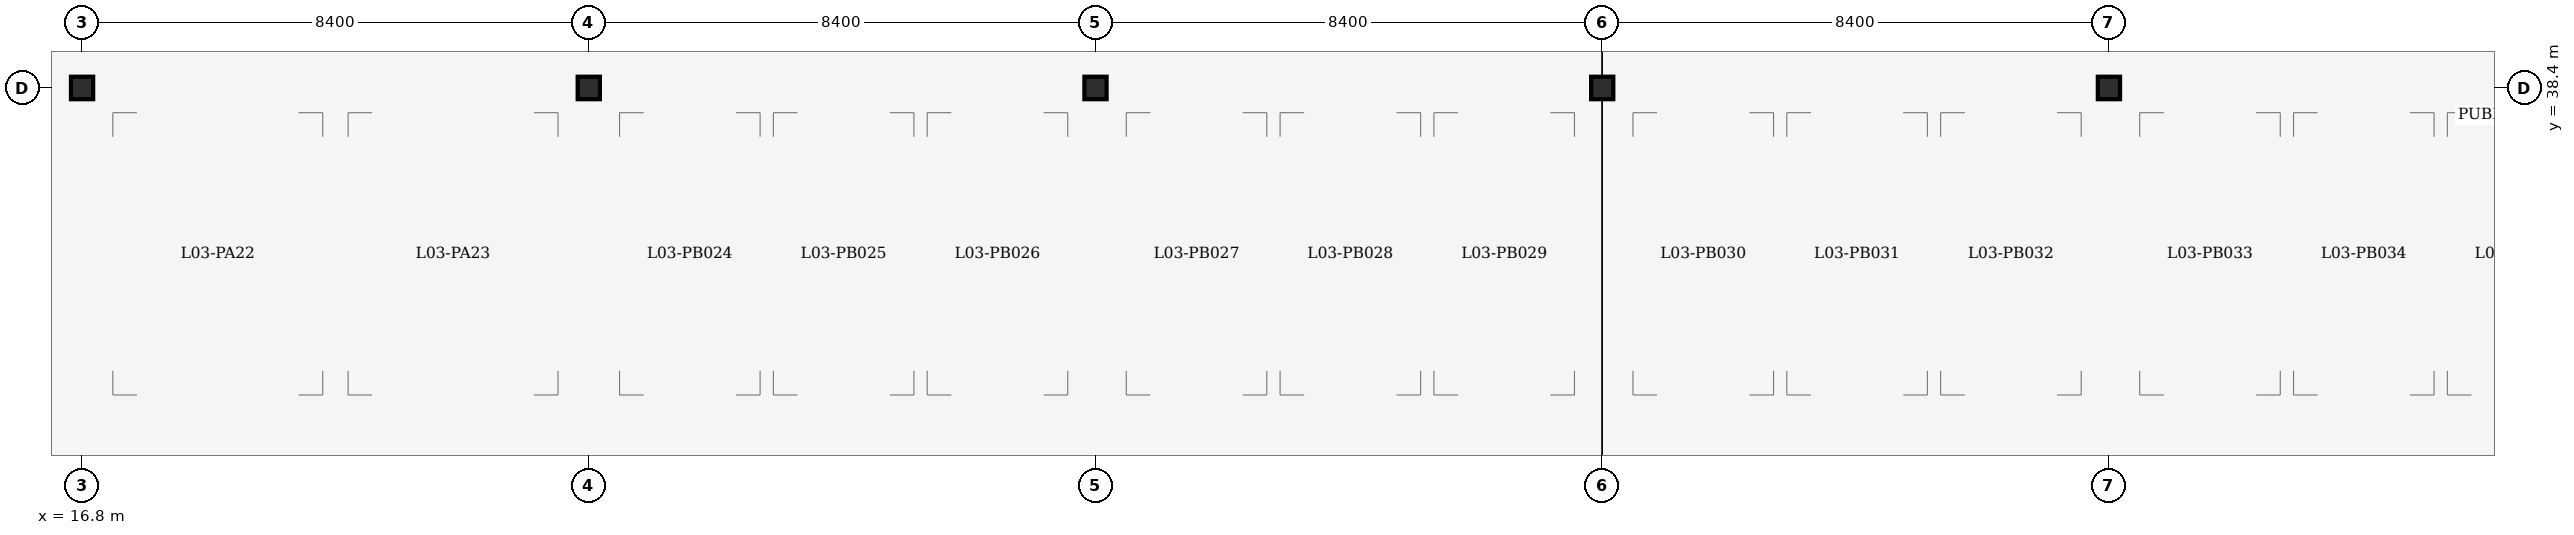
"""IFC4 building model, lengths in metres.
Left out: names, types, materials, properties, quantities, classifications, styles, units other than length and angle.
Written with IfcOpenShell. Run it as: python <this file> out.ifc"""

import sys

from ifc_helpers import new_model, si_unit, direction, frame, origin, origin_2d, place, context, subcontext, project, spatial, i_section, extrude, element, save


model = new_model("IFC4")
c1 = context("Model", 3, precision=1e-05, world=origin(), true_north=direction((0.0, 1.0)))
c2 = subcontext(c1, "Body", "Model", "MODEL_VIEW")
j1 = project(units=[si_unit("LENGTHUNIT", "METRE"), si_unit("PLANEANGLEUNIT", "RADIAN")], contexts=[c1])
p1 = place(None, origin())
s1 = spatial("IfcSite", under=j1, at=p1, CompositionType="ELEMENT")
p2 = place(p1, origin())
s2 = spatial("IfcBuilding", under=s1, at=p2, CompositionType="ELEMENT")
p3 = place(p2, frame((0.0, 0.0, 12.6)))
s3 = spatial("IfcBuildingStorey", under=s2, at=p3, CompositionType="ELEMENT", Elevation=12.6)
for number, where, z_axis, x_axis in (
    (1, (16.8, 38.4, 0.0), (0.0, 0.0, 1.0), (1.0, 0.0, 0.0)),
    (2, (25.2, 38.4, 0.0), (0.0, 0.0, 1.0), (1.0, 0.0, 0.0)),
    (3, (33.6, 38.4, 0.0), (0.0, 0.0, 1.0), (1.0, 0.0, 0.0)),
    (4, (42.0, 38.4, 0.0), (0.0, 0.0, 1.0), (1.0, 0.0, 0.0)),
    (5, (50.4, 38.4, 0.0), (0.0, 0.0, 1.0), (1.0, 0.0, 0.0)),
):
    element("IfcColumn", number, at=place(p3, frame(where, z_axis=z_axis, x_axis=x_axis)), inside=s3, PredefinedType="COLUMN", context=c2, shape_type="SweptSolid", body=[
        extrude(i_section(OverallWidth=0.373, OverallDepth=0.368, WebThickness=0.014, FlangeThickness=0.024, FilletRadius=0.015, at=origin_2d()), origin(), (0.0, 0.0, 1.0), 3.6),
    ])
save(model, sys.argv[1])
